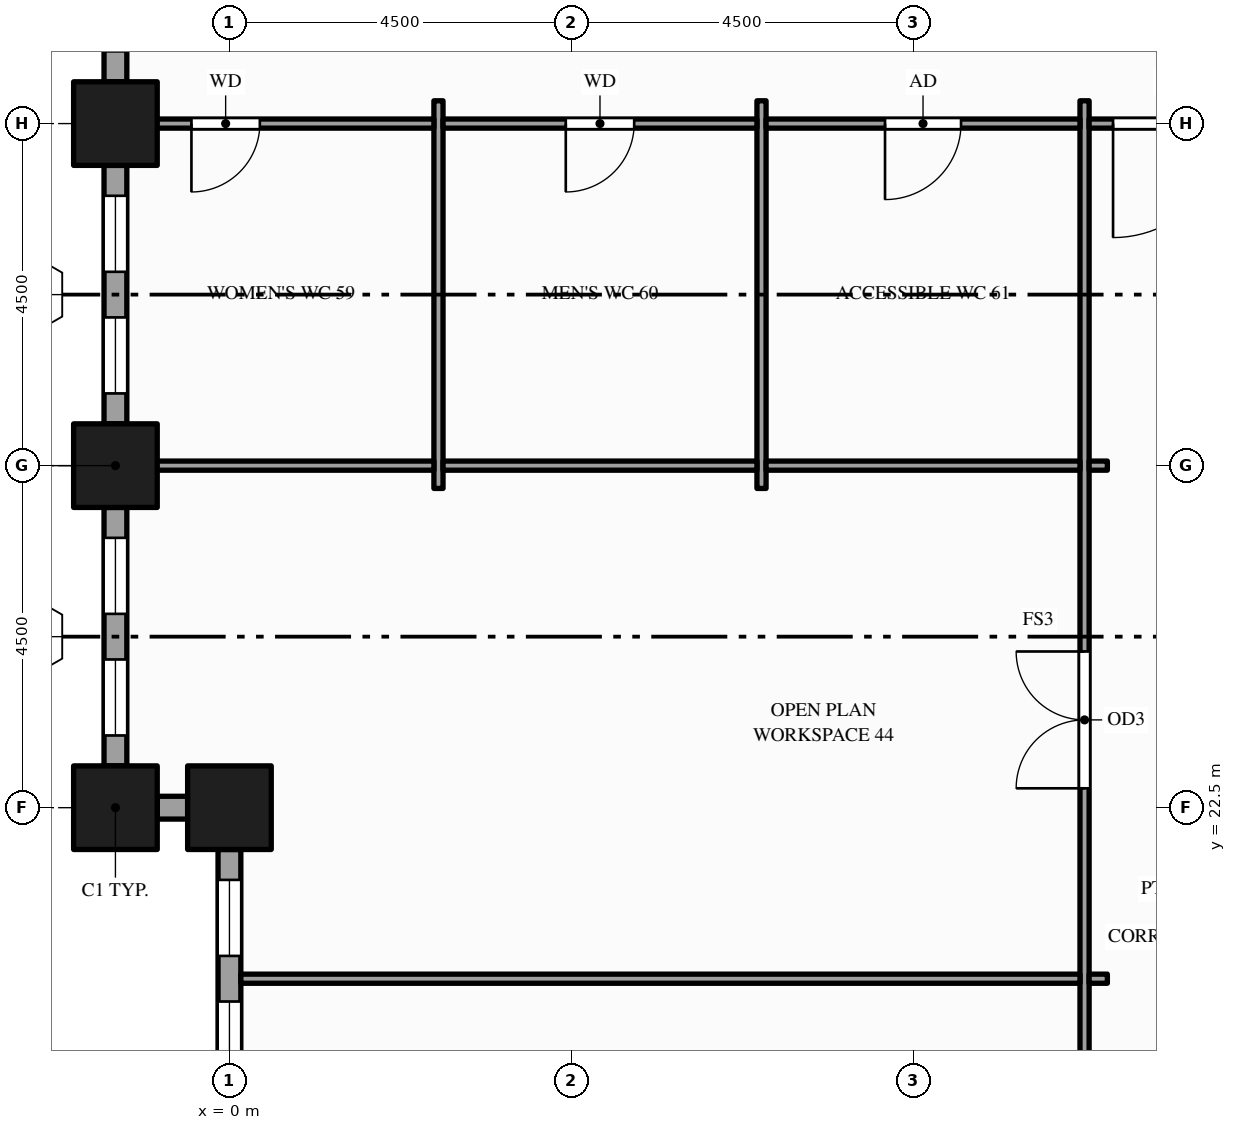
"""IFC4 building model, lengths in metres.
Left out: names, types, materials, properties, quantities, classifications, styles, units other than length and angle.
Written with IfcOpenShell. Run it as: python <this file> out.ifc"""

import sys

from ifc_helpers import new_model, si_unit, direction, frame, frame_2d, origin, origin_2d, place, context, subcontext, project, spatial, rectangle, hollow_rectangle, extrude, element, fill, save


model = new_model("IFC4")
c1 = context("Model", 3, precision=1e-05, world=origin(), true_north=direction((0.0, 1.0)))
c2 = subcontext(c1, "Body", "Model", "MODEL_VIEW")
j1 = project(units=[si_unit("LENGTHUNIT", "METRE"), si_unit("PLANEANGLEUNIT", "RADIAN")], contexts=[c1])
p1 = place(None, origin())
s1 = spatial("IfcSite", under=j1, at=p1, CompositionType="ELEMENT")
p2 = place(p1, origin())
s2 = spatial("IfcBuilding", under=s1, at=p2, CompositionType="ELEMENT")
p3 = place(p2, frame((0.0, 0.0, 57.0)))
s3 = spatial("IfcBuildingStorey", under=s2, at=p3, CompositionType="ELEMENT", Elevation=57.0)
for number, where, z_axis, x_axis in (
    (1, (-1.5, 22.5, -0.15), (0.0, 0.0, 1.0), (1.0, 0.0, 0.0)),
    (2, (-1.5, 27.0, -0.15), (0.0, 0.0, 1.0), (1.0, 0.0, 0.0)),
    (3, (-1.5, 31.5, -0.15), (0.0, 0.0, 1.0), (1.0, 0.0, 0.0)),
    (4, (0.0, 22.5, -0.15), (0.0, 0.0, 1.0), (1.0, 0.0, 0.0)),
):
    element("IfcColumn", number, at=place(p3, frame(where, z_axis=z_axis, x_axis=x_axis)), inside=s3, PredefinedType="COLUMN", context=c2, shape_type="SweptSolid", body=[
        extrude(hollow_rectangle(XDim=1.1, YDim=1.1, WallThickness=0.06, at=origin_2d()), origin(), (0.0, 0.0, 1.0), 4.0),
    ])
p4 = place(p3, frame((-1.5, 35.45, 0.0), z_axis=(0.0, 0.0, 1.0), x_axis=(0.0, -1.0, 0.0)))
e5 = element("IfcWall", 5, at=p4, inside=s3, PredefinedType="STANDARD", context=c2, shape_type="SweptSolid", body=[
    extrude(rectangle(XDim=3.4, YDim=0.3, at=frame_2d((1.7, 0.0))), origin(), (0.0, 0.0, 1.0), 3.144),
])
p5 = place(p4, frame((0.4, 0.0, 0.9)))
e6 = element("IfcOpeningElement", 6, at=p5, cuts=e5, PredefinedType="OPENING", context=c2, shape_type="SweptSolid", body=[
    extrude(rectangle(XDim=1.0, YDim=2.0, at=frame_2d((0.5, 1.0))), frame((0.0, 0.16, 0.0), z_axis=(0.0, -1.0, 0.0), x_axis=(1.0, 0.0, 0.0)), (0.0, 0.0, 1.0), 0.32),
])
p6 = place(p4, frame((2.0, 0.0, 0.9)))
e7 = element("IfcOpeningElement", 7, at=p6, cuts=e5, PredefinedType="OPENING", context=c2, shape_type="SweptSolid", body=[
    extrude(rectangle(XDim=1.0, YDim=2.0, at=frame_2d((0.5, 1.0))), frame((0.0, 0.16, 0.0), z_axis=(0.0, -1.0, 0.0), x_axis=(1.0, 0.0, 0.0)), (0.0, 0.0, 1.0), 0.32),
])
p7 = place(p3, frame((-1.5, 30.95, 0.0), z_axis=(0.0, 0.0, 1.0), x_axis=(0.0, -1.0, 0.0)))
e8 = element("IfcWall", 8, at=p7, inside=s3, PredefinedType="STANDARD", context=c2, shape_type="SweptSolid", body=[
    extrude(rectangle(XDim=3.4, YDim=0.3, at=frame_2d((1.7, 0.0))), origin(), (0.0, 0.0, 1.0), 3.144),
])
p8 = place(p7, frame((0.4, 0.0, 0.9)))
e9 = element("IfcOpeningElement", 9, at=p8, cuts=e8, PredefinedType="OPENING", context=c2, shape_type="SweptSolid", body=[
    extrude(rectangle(XDim=1.0, YDim=2.0, at=frame_2d((0.5, 1.0))), frame((0.0, 0.16, 0.0), z_axis=(0.0, -1.0, 0.0), x_axis=(1.0, 0.0, 0.0)), (0.0, 0.0, 1.0), 0.32),
])
p9 = place(p7, frame((2.0, 0.0, 0.9)))
e10 = element("IfcOpeningElement", 10, at=p9, cuts=e8, PredefinedType="OPENING", context=c2, shape_type="SweptSolid", body=[
    extrude(rectangle(XDim=1.0, YDim=2.0, at=frame_2d((0.5, 1.0))), frame((0.0, 0.16, 0.0), z_axis=(0.0, -1.0, 0.0), x_axis=(1.0, 0.0, 0.0)), (0.0, 0.0, 1.0), 0.32),
])
p10 = place(p3, frame((-1.5, 26.45, 0.0), z_axis=(0.0, 0.0, 1.0), x_axis=(0.0, -1.0, 0.0)))
e11 = element("IfcWall", 11, at=p10, inside=s3, PredefinedType="STANDARD", context=c2, shape_type="SweptSolid", body=[
    extrude(rectangle(XDim=3.4, YDim=0.3, at=frame_2d((1.7, 0.0))), origin(), (0.0, 0.0, 1.0), 3.144),
])
p11 = place(p10, frame((0.4, 0.0, 0.9)))
e12 = element("IfcOpeningElement", 12, at=p11, cuts=e11, PredefinedType="OPENING", context=c2, shape_type="SweptSolid", body=[
    extrude(rectangle(XDim=1.0, YDim=2.0, at=frame_2d((0.5, 1.0))), frame((0.0, 0.16, 0.0), z_axis=(0.0, -1.0, 0.0), x_axis=(1.0, 0.0, 0.0)), (0.0, 0.0, 1.0), 0.32),
])
p12 = place(p10, frame((2.0, 0.0, 0.9)))
e13 = element("IfcOpeningElement", 13, at=p12, cuts=e11, PredefinedType="OPENING", context=c2, shape_type="SweptSolid", body=[
    extrude(rectangle(XDim=1.0, YDim=2.0, at=frame_2d((0.5, 1.0))), frame((0.0, 0.16, 0.0), z_axis=(0.0, -1.0, 0.0), x_axis=(1.0, 0.0, 0.0)), (0.0, 0.0, 1.0), 0.32),
])
p13 = place(p3, frame((-0.95, 22.5, 0.0), z_axis=(0.0, 0.0, 1.0), x_axis=(1.0, 0.0, 0.0)))
e14 = element("IfcWall", 14, at=p13, inside=s3, PredefinedType="STANDARD", context=c2, shape_type="SweptSolid", body=[
    extrude(rectangle(XDim=0.4, YDim=0.3, at=frame_2d((0.2, 0.0))), origin(), (0.0, 0.0, 1.0), 3.144),
])
p14 = place(p3, frame((0.0, 21.95, 0.0), z_axis=(0.0, 0.0, 1.0), x_axis=(0.0, -1.0, 0.0)))
e15 = element("IfcWall", 15, at=p14, inside=s3, PredefinedType="STANDARD", context=c2, shape_type="SweptSolid", body=[
    extrude(rectangle(XDim=3.4, YDim=0.3, at=frame_2d((1.7, 0.0))), origin(), (0.0, 0.0, 1.0), 3.144),
])
p15 = place(p14, frame((0.4, 0.0, 0.9)))
e16 = element("IfcOpeningElement", 16, at=p15, cuts=e15, PredefinedType="OPENING", context=c2, shape_type="SweptSolid", body=[
    extrude(rectangle(XDim=1.0, YDim=2.0, at=frame_2d((0.5, 1.0))), frame((0.0, 0.16, 0.0), z_axis=(0.0, -1.0, 0.0), x_axis=(1.0, 0.0, 0.0)), (0.0, 0.0, 1.0), 0.32),
])
p16 = place(p14, frame((2.0, 0.0, 0.9)))
e17 = element("IfcOpeningElement", 17, at=p16, cuts=e15, PredefinedType="OPENING", context=c2, shape_type="SweptSolid", body=[
    extrude(rectangle(XDim=1.0, YDim=2.0, at=frame_2d((0.5, 1.0))), frame((0.0, 0.16, 0.0), z_axis=(0.0, -1.0, 0.0), x_axis=(1.0, 0.0, 0.0)), (0.0, 0.0, 1.0), 0.32),
])
for number, where, z_axis, x_axis in (
    (18, (2.75, 26.7, 0.0), (0.0, 0.0, 1.0), (0.0, 1.0, 0.0)),
    (19, (7.0, 26.7, 0.0), (0.0, 0.0, 1.0), (0.0, 1.0, 0.0)),
):
    element("IfcWall", number, at=place(p3, frame(where, z_axis=z_axis, x_axis=x_axis)), inside=s3, PredefinedType="PARTITIONING", context=c2, shape_type="SweptSolid", body=[
        extrude(rectangle(XDim=5.1, YDim=0.12, at=frame_2d((2.55, 0.0))), origin(), (0.0, 0.0, 1.0), 3.85),
    ])
p17 = place(p3, frame((11.25, 8.7, 0.0), z_axis=(0.0, 0.0, 1.0), x_axis=(0.0, 1.0, 0.0)))
e20 = element("IfcWall", 20, at=p17, inside=s3, PredefinedType="PARTITIONING", context=c2, shape_type="SweptSolid", body=[
    extrude(rectangle(XDim=23.1, YDim=0.12, at=frame_2d((11.55, 0.0))), origin(), (0.0, 0.0, 1.0), 2.6),
])
p18 = place(p17, frame((2.05, 0.0, 0.0)))
e21 = element("IfcOpeningElement", 21, at=p18, cuts=e20, PredefinedType="OPENING", context=c2, shape_type="SweptSolid", body=[
    extrude(rectangle(XDim=1.0, YDim=2.1, at=frame_2d((0.5, 1.05))), frame((0.0, 0.07, 0.0), z_axis=(0.0, -1.0, 0.0), x_axis=(1.0, 0.0, 0.0)), (0.0, 0.0, 1.0), 0.14),
])
p19 = place(p17, frame((7.675, 0.0, 0.0)))
e22 = element("IfcOpeningElement", 22, at=p19, cuts=e20, PredefinedType="OPENING", context=c2, shape_type="SweptSolid", body=[
    extrude(rectangle(XDim=1.0, YDim=2.1, at=frame_2d((0.5, 1.05))), frame((0.0, 0.07, 0.0), z_axis=(0.0, -1.0, 0.0), x_axis=(1.0, 0.0, 0.0)), (0.0, 0.0, 1.0), 0.14),
])
p20 = place(p17, frame((14.055, 0.0, 0.0)))
e23 = element("IfcOpeningElement", 23, at=p20, cuts=e20, PredefinedType="OPENING", context=c2, shape_type="SweptSolid", body=[
    extrude(rectangle(XDim=1.8, YDim=2.1, at=frame_2d((0.9, 1.05))), frame((0.0, 0.07, 0.0), z_axis=(0.0, -1.0, 0.0), x_axis=(1.0, 0.0, 0.0)), (0.0, 0.0, 1.0), 0.14),
])
p21 = place(p3, frame((0.15, 20.25, 0.0), z_axis=(0.0, 0.0, 1.0), x_axis=(1.0, 0.0, 0.0)))
e24 = element("IfcWall", 24, at=p21, inside=s3, PredefinedType="PARTITIONING", context=c2, shape_type="SweptSolid", body=[
    extrude(rectangle(XDim=11.04, YDim=0.12, at=frame_2d((5.52, 0.0))), origin(), (0.0, 0.0, 1.0), 2.938),
])
p22 = place(p3, frame((11.31, 20.25, 0.0), z_axis=(0.0, 0.0, 1.0), x_axis=(1.0, 0.0, 0.0)))
e25 = element("IfcWall", 25, at=p22, inside=s3, PredefinedType="PARTITIONING", context=c2, shape_type="SweptSolid", body=[
    extrude(rectangle(XDim=0.24, YDim=0.12, at=frame_2d((0.12, 0.0))), origin(), (0.0, 0.0, 1.0), 2.938),
])
p23 = place(p3, frame((-1.35, 27.0, 0.0), z_axis=(0.0, 0.0, 1.0), x_axis=(1.0, 0.0, 0.0)))
e26 = element("IfcWall", 26, at=p23, inside=s3, PredefinedType="PARTITIONING", context=c2, shape_type="SweptSolid", body=[
    extrude(rectangle(XDim=4.04, YDim=0.12, at=frame_2d((2.02, 0.0))), origin(), (0.0, 0.0, 1.0), 2.938),
])
for number, where, z_axis, x_axis in (
    (27, (2.81, 27.0, 0.0), (0.0, 0.0, 1.0), (1.0, 0.0, 0.0)),
    (28, (7.06, 27.0, 0.0), (0.0, 0.0, 1.0), (1.0, 0.0, 0.0)),
):
    element("IfcWall", number, at=place(p3, frame(where, z_axis=z_axis, x_axis=x_axis)), inside=s3, PredefinedType="PARTITIONING", context=c2, shape_type="SweptSolid", body=[
        extrude(rectangle(XDim=4.13, YDim=0.12, at=frame_2d((2.065, 0.0))), origin(), (0.0, 0.0, 1.0), 2.938),
    ])
p24 = place(p3, frame((11.31, 27.0, 0.0), z_axis=(0.0, 0.0, 1.0), x_axis=(1.0, 0.0, 0.0)))
e29 = element("IfcWall", 29, at=p24, inside=s3, PredefinedType="PARTITIONING", context=c2, shape_type="SweptSolid", body=[
    extrude(rectangle(XDim=0.24, YDim=0.12, at=frame_2d((0.12, 0.0))), origin(), (0.0, 0.0, 1.0), 2.938),
])
p25 = place(p3, frame((-1.35, 31.5, 0.0), z_axis=(0.0, 0.0, 1.0), x_axis=(1.0, 0.0, 0.0)))
e30 = element("IfcWall", 30, at=p25, inside=s3, PredefinedType="PARTITIONING", context=c2, shape_type="SweptSolid", body=[
    extrude(rectangle(XDim=4.04, YDim=0.12, at=frame_2d((2.02, 0.0))), origin(), (0.0, 0.0, 1.0), 2.938),
])
p26 = place(p25, frame((0.85, 0.0, 0.0)))
e31 = element("IfcOpeningElement", 31, at=p26, cuts=e30, PredefinedType="OPENING", context=c2, shape_type="SweptSolid", body=[
    extrude(rectangle(XDim=0.9, YDim=2.1, at=frame_2d((0.45, 1.05))), frame((0.0, 0.07, 0.0), z_axis=(0.0, -1.0, 0.0), x_axis=(1.0, 0.0, 0.0)), (0.0, 0.0, 1.0), 0.14),
])
p27 = place(p3, frame((2.81, 31.5, 0.0), z_axis=(0.0, 0.0, 1.0), x_axis=(1.0, 0.0, 0.0)))
e32 = element("IfcWall", 32, at=p27, inside=s3, PredefinedType="PARTITIONING", context=c2, shape_type="SweptSolid", body=[
    extrude(rectangle(XDim=4.13, YDim=0.12, at=frame_2d((2.065, 0.0))), origin(), (0.0, 0.0, 1.0), 2.938),
])
p28 = place(p27, frame((1.615, 0.0, 0.0)))
e33 = element("IfcOpeningElement", 33, at=p28, cuts=e32, PredefinedType="OPENING", context=c2, shape_type="SweptSolid", body=[
    extrude(rectangle(XDim=0.9, YDim=2.1, at=frame_2d((0.45, 1.05))), frame((0.0, 0.07, 0.0), z_axis=(0.0, -1.0, 0.0), x_axis=(1.0, 0.0, 0.0)), (0.0, 0.0, 1.0), 0.14),
])
p29 = place(p3, frame((7.06, 31.5, 0.0), z_axis=(0.0, 0.0, 1.0), x_axis=(1.0, 0.0, 0.0)))
e34 = element("IfcWall", 34, at=p29, inside=s3, PredefinedType="PARTITIONING", context=c2, shape_type="SweptSolid", body=[
    extrude(rectangle(XDim=4.13, YDim=0.12, at=frame_2d((2.065, 0.0))), origin(), (0.0, 0.0, 1.0), 2.938),
])
p30 = place(p29, frame((1.565, 0.0, 0.0)))
e35 = element("IfcOpeningElement", 35, at=p30, cuts=e34, PredefinedType="OPENING", context=c2, shape_type="SweptSolid", body=[
    extrude(rectangle(XDim=1.0, YDim=2.1, at=frame_2d((0.5, 1.05))), frame((0.0, 0.07, 0.0), z_axis=(0.0, -1.0, 0.0), x_axis=(1.0, 0.0, 0.0)), (0.0, 0.0, 1.0), 0.14),
])
p31 = place(p3, frame((11.31, 31.5, 0.0), z_axis=(0.0, 0.0, 1.0), x_axis=(1.0, 0.0, 0.0)))
e36 = element("IfcWall", 36, at=p31, inside=s3, PredefinedType="PARTITIONING", context=c2, shape_type="SweptSolid", body=[
    extrude(rectangle(XDim=2.13, YDim=0.12, at=frame_2d((1.065, 0.0))), origin(), (0.0, 0.0, 1.0), 2.938),
])
p32 = place(p31, frame((0.315, 0.0, 0.0)))
e37 = element("IfcOpeningElement", 37, at=p32, cuts=e36, PredefinedType="OPENING", context=c2, shape_type="SweptSolid", body=[
    extrude(rectangle(XDim=1.5, YDim=2.1, at=frame_2d((0.75, 1.05))), frame((0.0, 0.07, 0.0), z_axis=(0.0, -1.0, 0.0), x_axis=(1.0, 0.0, 0.0)), (0.0, 0.0, 1.0), 0.14),
])
p33 = place(p8, origin())
e38 = element("IfcWindow", 38, at=p33, inside=s3, PartitioningType="SINGLE_PANEL", PredefinedType="WINDOW", context=c2, shape_type="SweptSolid", body=[
    extrude(rectangle(XDim=1.0, YDim=2.0, at=frame_2d((0.5, 1.0))), frame((0.0, 0.03, 0.0), z_axis=(0.0, -1.0, 0.0), x_axis=(1.0, 0.0, 0.0)), (0.0, 0.0, 1.0), 0.06),
])
fill(e9, e38)
p34 = place(p9, origin())
e39 = element("IfcWindow", 39, at=p34, inside=s3, PartitioningType="SINGLE_PANEL", PredefinedType="WINDOW", context=c2, shape_type="SweptSolid", body=[
    extrude(rectangle(XDim=1.0, YDim=2.0, at=frame_2d((0.5, 1.0))), frame((0.0, 0.03, 0.0), z_axis=(0.0, -1.0, 0.0), x_axis=(1.0, 0.0, 0.0)), (0.0, 0.0, 1.0), 0.06),
])
fill(e10, e39)
p35 = place(p11, origin())
e40 = element("IfcWindow", 40, at=p35, inside=s3, PartitioningType="SINGLE_PANEL", PredefinedType="WINDOW", context=c2, shape_type="SweptSolid", body=[
    extrude(rectangle(XDim=1.0, YDim=2.0, at=frame_2d((0.5, 1.0))), frame((0.0, 0.03, 0.0), z_axis=(0.0, -1.0, 0.0), x_axis=(1.0, 0.0, 0.0)), (0.0, 0.0, 1.0), 0.06),
])
fill(e12, e40)
p36 = place(p12, origin())
e41 = element("IfcWindow", 41, at=p36, inside=s3, PartitioningType="SINGLE_PANEL", PredefinedType="WINDOW", context=c2, shape_type="SweptSolid", body=[
    extrude(rectangle(XDim=1.0, YDim=2.0, at=frame_2d((0.5, 1.0))), frame((0.0, 0.03, 0.0), z_axis=(0.0, -1.0, 0.0), x_axis=(1.0, 0.0, 0.0)), (0.0, 0.0, 1.0), 0.06),
])
fill(e13, e41)
p37 = place(p15, origin())
e42 = element("IfcWindow", 42, at=p37, inside=s3, PartitioningType="SINGLE_PANEL", PredefinedType="WINDOW", context=c2, shape_type="SweptSolid", body=[
    extrude(rectangle(XDim=1.0, YDim=2.0, at=frame_2d((0.5, 1.0))), frame((0.0, 0.03, 0.0), z_axis=(0.0, -1.0, 0.0), x_axis=(1.0, 0.0, 0.0)), (0.0, 0.0, 1.0), 0.06),
])
fill(e16, e42)
p38 = place(p16, origin())
e43 = element("IfcWindow", 43, at=p38, inside=s3, PartitioningType="SINGLE_PANEL", PredefinedType="WINDOW", context=c2, shape_type="SweptSolid", body=[
    extrude(rectangle(XDim=1.0, YDim=2.0, at=frame_2d((0.5, 1.0))), frame((0.0, 0.03, 0.0), z_axis=(0.0, -1.0, 0.0), x_axis=(1.0, 0.0, 0.0)), (0.0, 0.0, 1.0), 0.06),
])
fill(e17, e43)
p39 = place(p32, origin())
e44 = element("IfcDoor", 44, at=p39, inside=s3, OperationType="SINGLE_SWING_LEFT", PredefinedType="DOOR", context=c2, shape_type="SweptSolid", body=[
    extrude(rectangle(XDim=1.5, YDim=2.1, at=frame_2d((0.75, 1.05))), frame((0.0, 0.025, 0.0), z_axis=(0.0, -1.0, 0.0), x_axis=(1.0, 0.0, 0.0)), (0.0, 0.0, 1.0), 0.05),
])
fill(e37, e44)
p40 = place(p20, origin())
e45 = element("IfcDoor", 45, at=p40, inside=s3, OperationType="DOUBLE_DOOR_SINGLE_SWING", PredefinedType="DOOR", context=c2, shape_type="SweptSolid", body=[
    extrude(rectangle(XDim=1.8, YDim=2.1, at=frame_2d((0.9, 1.05))), frame((0.0, 0.025, 0.0), z_axis=(0.0, -1.0, 0.0), x_axis=(1.0, 0.0, 0.0)), (0.0, 0.0, 1.0), 0.05),
])
fill(e23, e45)
p41 = place(p26, origin())
e46 = element("IfcDoor", 46, at=p41, inside=s3, OperationType="SINGLE_SWING_LEFT", PredefinedType="DOOR", context=c2, shape_type="SweptSolid", body=[
    extrude(rectangle(XDim=0.9, YDim=2.1, at=frame_2d((0.45, 1.05))), frame((0.0, 0.025, 0.0), z_axis=(0.0, -1.0, 0.0), x_axis=(1.0, 0.0, 0.0)), (0.0, 0.0, 1.0), 0.05),
])
fill(e31, e46)
p42 = place(p28, origin())
e47 = element("IfcDoor", 47, at=p42, inside=s3, OperationType="SINGLE_SWING_LEFT", PredefinedType="DOOR", context=c2, shape_type="SweptSolid", body=[
    extrude(rectangle(XDim=0.9, YDim=2.1, at=frame_2d((0.45, 1.05))), frame((0.0, 0.025, 0.0), z_axis=(0.0, -1.0, 0.0), x_axis=(1.0, 0.0, 0.0)), (0.0, 0.0, 1.0), 0.05),
])
fill(e33, e47)
p43 = place(p30, origin())
e48 = element("IfcDoor", 48, at=p43, inside=s3, OperationType="SINGLE_SWING_LEFT", PredefinedType="DOOR", context=c2, shape_type="SweptSolid", body=[
    extrude(rectangle(XDim=1.0, YDim=2.1, at=frame_2d((0.5, 1.05))), frame((0.0, 0.025, 0.0), z_axis=(0.0, -1.0, 0.0), x_axis=(1.0, 0.0, 0.0)), (0.0, 0.0, 1.0), 0.05),
])
fill(e35, e48)
save(model, sys.argv[1])
